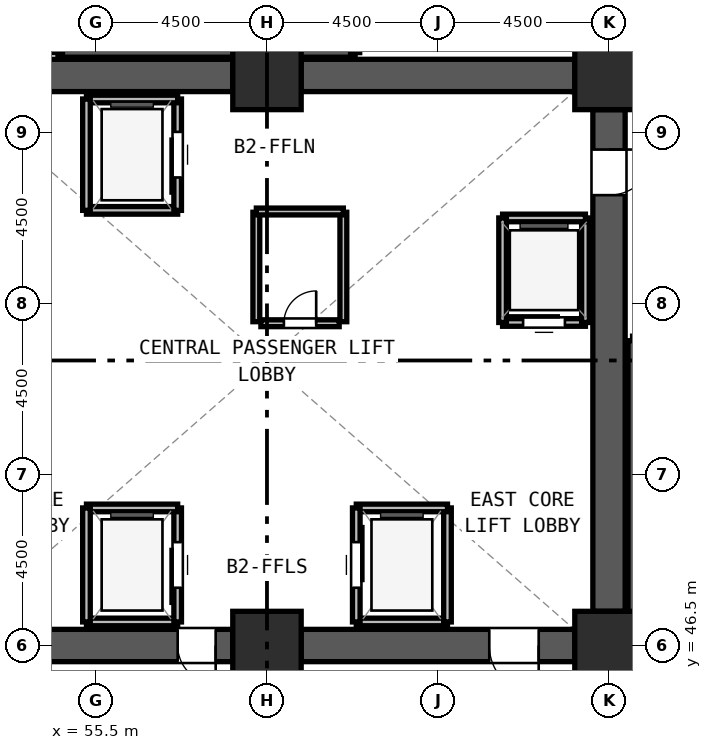
"""IFC4 building model, lengths in metres.
Left out: names, types, materials, properties, quantities, classifications, styles, units other than length and angle.
Written with IfcOpenShell. Run it as: python <this file> out.ifc"""

import sys

from ifc_helpers import new_model, si_unit, direction, frame, frame_2d, origin, origin_2d, place, context, subcontext, project, spatial, rectangle, extrude, source, transform, mapped, element, fill, save


model = new_model("IFC4")
c1 = context("Model", 3, precision=1e-05, world=origin(), true_north=direction((0.0, 1.0)))
c2 = subcontext(c1, "Body", "Model", "MODEL_VIEW")
j1 = project(units=[si_unit("LENGTHUNIT", "METRE"), si_unit("PLANEANGLEUNIT", "RADIAN")], contexts=[c1])
p1 = place(None, origin())
s1 = spatial("IfcSite", under=j1, at=p1, CompositionType="ELEMENT")
p2 = place(p1, origin())
s2 = spatial("IfcBuilding", under=s1, at=p2, CompositionType="ELEMENT")
p3 = place(p2, frame((0.0, 0.0, -9.6)))
s3 = spatial("IfcBuildingStorey", under=s2, at=p3, CompositionType="ELEMENT", Elevation=-9.6)
m1 = source(origin(), c2, "Body", "SweptSolid", [
    extrude(rectangle(XDim=1.8, YDim=1.8, at=origin_2d()), origin(), (0.0, 0.0, 1.0), 4.8),
])
for number, where, z_axis, x_axis in (
    (1, (60.0, 46.5, 0.0), (0.0, 0.0, 1.0), (1.0, 0.0, 0.0)),
    (2, (69.0, 46.5, 0.0), (0.0, 0.0, 1.0), (1.0, 0.0, 0.0)),
    (3, (69.0, 61.5, 0.0), (0.0, 0.0, 1.0), (1.0, 0.0, 0.0)),
    (4, (60.0, 61.5, 0.0), (0.0, 0.0, 1.0), (1.0, 0.0, 0.0)),
):
    element("IfcColumn", number, at=place(p3, frame(where, z_axis=z_axis, x_axis=x_axis)), inside=s3, PredefinedType="COLUMN", context=c2, shape_type="MappedRepresentation", body=[
        mapped(m1, transform((0.0, 0.0, 0.0), x_axis=(1.0, 0.0, 0.0), y_axis=(0.0, 1.0, 0.0), z_axis=(0.0, 0.0, 1.0), scale=1.0)),
    ])
for number, where, z_axis, x_axis in (
    (5, (51.9, 61.5, 0.0), (0.0, 0.0, 1.0), (1.0, 0.0, 0.0)),
    (6, (60.9, 61.5, 0.0), (0.0, 0.0, 1.0), (1.0, 0.0, 0.0)),
):
    element("IfcWall", number, at=place(p3, frame(where, z_axis=z_axis, x_axis=x_axis)), inside=s3, PredefinedType="SHEAR", context=c2, shape_type="SweptSolid", body=[
        extrude(rectangle(XDim=7.2, YDim=0.85, at=frame_2d((3.6, 0.0))), origin(), (0.0, 0.0, 1.0), 4.5),
    ])
p4 = place(p3, frame((69.0, 60.6, 0.0), z_axis=(0.0, 0.0, 1.0), x_axis=(0.0, -1.0, 0.0)))
e7 = element("IfcWall", 7, at=p4, inside=s3, PredefinedType="SHEAR", context=c2, shape_type="SweptSolid", body=[
    extrude(rectangle(XDim=13.2, YDim=0.85, at=frame_2d((6.6, 0.0))), origin(), (0.0, 0.0, 1.0), 4.5),
])
m2 = source(origin(), c2, "Body", "SweptSolid", [
    extrude(rectangle(XDim=1.2, YDim=2.2, at=frame_2d((0.6, 1.1))), frame((0.0, 0.435, 0.0), z_axis=(0.0, -1.0, 0.0), x_axis=(1.0, 0.0, 0.0)), (0.0, 0.0, 1.0), 0.87),
])
p5 = place(p4, frame((1.05, 0.0, 0.0)))
e8 = element("IfcOpeningElement", 8, at=p5, cuts=e7, PredefinedType="OPENING", context=c2, shape_type="MappedRepresentation", body=[
    mapped(m2, transform((0.0, 0.0, 0.0), x_axis=(1.0, 0.0, 0.0), y_axis=(0.0, 1.0, 0.0), z_axis=(0.0, 0.0, 1.0), scale=1.0)),
])
p6 = place(p3, frame((68.1, 46.5, 0.0), z_axis=(0.0, 0.0, 1.0), x_axis=(-1.0, 0.0, 0.0)))
e9 = element("IfcWall", 9, at=p6, inside=s3, PredefinedType="SHEAR", context=c2, shape_type="SweptSolid", body=[
    extrude(rectangle(XDim=7.2, YDim=0.85, at=frame_2d((3.6, 0.0))), origin(), (0.0, 0.0, 1.0), 4.5),
])
m3 = source(origin(), c2, "Body", "SweptSolid", [
    extrude(rectangle(XDim=1.3, YDim=2.2, at=frame_2d((0.65, 1.1))), frame((0.0, 0.435, 0.0), z_axis=(0.0, -1.0, 0.0), x_axis=(1.0, 0.0, 0.0)), (0.0, 0.0, 1.0), 0.87),
])
p7 = place(p6, frame((0.95, 0.0, 0.0)))
e10 = element("IfcOpeningElement", 10, at=p7, cuts=e9, PredefinedType="OPENING", context=c2, shape_type="MappedRepresentation", body=[
    mapped(m3, transform((0.0, 0.0, 0.0), x_axis=(1.0, 0.0, 0.0), y_axis=(0.0, 1.0, 0.0), z_axis=(0.0, 0.0, 1.0), scale=1.0)),
])
p8 = place(p3, frame((59.1, 46.5, 0.0), z_axis=(0.0, 0.0, 1.0), x_axis=(-1.0, 0.0, 0.0)))
e11 = element("IfcWall", 11, at=p8, inside=s3, PredefinedType="SHEAR", context=c2, shape_type="SweptSolid", body=[
    extrude(rectangle(XDim=7.2, YDim=0.85, at=frame_2d((3.6, 0.0))), origin(), (0.0, 0.0, 1.0), 4.5),
])
p9 = place(p8, frame((4.95, 0.0, 0.0)))
e12 = element("IfcOpeningElement", 12, at=p9, cuts=e11, PredefinedType="OPENING", context=c2, shape_type="MappedRepresentation", body=[
    mapped(m3, transform((0.0, 0.0, 0.0), x_axis=(1.0, 0.0, 0.0), y_axis=(0.0, 1.0, 0.0), z_axis=(0.0, 0.0, 1.0), scale=1.0)),
])
m4 = source(origin(), c2, "Body", "SweptSolid", [
    extrude(rectangle(XDim=1.0, YDim=2.2, at=frame_2d((0.5, 1.1))), frame((0.0, 0.435, 0.0), z_axis=(0.0, -1.0, 0.0), x_axis=(1.0, 0.0, 0.0)), (0.0, 0.0, 1.0), 0.87),
])
p10 = place(p8, frame((0.45, 0.0, 0.0)))
e13 = element("IfcOpeningElement", 13, at=p10, cuts=e11, PredefinedType="OPENING", context=c2, shape_type="MappedRepresentation", body=[
    mapped(m4, transform((0.0, 0.0, 0.0), x_axis=(1.0, 0.0, 0.0), y_axis=(0.0, 1.0, 0.0), z_axis=(0.0, 0.0, 1.0), scale=1.0)),
])
for number, where, z_axis, x_axis in (
    (14, (69.62, 54.52, 0.0), (0.0, 0.0, 1.0), (0.0, -1.0, 0.0)),
    (15, (54.5, 62.1, 0.0), (0.0, 0.0, 1.0), (1.0, 0.0, 0.0)),
):
    element("IfcWall", number, at=place(p3, frame(where, z_axis=z_axis, x_axis=x_axis)), inside=s3, PredefinedType="SOLIDWALL", context=c2, shape_type="SweptSolid", body=[
        extrude(rectangle(XDim=7.82, YDim=0.24, at=frame_2d((3.91, 0.0))), origin(), (0.0, 0.0, 1.0), 4.5),
    ])
for number, where, z_axis, x_axis in (
    (16, (62.32, 62.1, 0.0), (0.0, 0.0, 1.0), (0.0, 1.0, 0.0)),
    (17, (54.5, 65.54, 0.0), (0.0, 0.0, 1.0), (0.0, -1.0, 0.0)),
):
    element("IfcWall", number, at=place(p3, frame(where, z_axis=z_axis, x_axis=x_axis)), inside=s3, PredefinedType="SOLIDWALL", context=c2, shape_type="SweptSolid", body=[
        extrude(rectangle(XDim=3.44, YDim=0.24, at=frame_2d((1.72, 0.0))), origin(), (0.0, 0.0, 1.0), 4.5),
    ])
p11 = place(p3, frame((55.25, 47.12, 0.0), z_axis=(0.0, 0.0, 1.0), x_axis=(1.0, 0.0, 0.0)))
e18 = element("IfcWall", 18, at=p11, inside=s3, PredefinedType="SOLIDWALL", context=c2, shape_type="SweptSolid", body=[
    extrude(rectangle(XDim=2.4, YDim=0.2, at=frame_2d((1.2, 0.0))), origin(), (0.0, 0.0, 1.0), 4.5),
])
p12 = place(p3, frame((57.65, 47.12, 0.0), z_axis=(0.0, 0.0, 1.0), x_axis=(0.0, 1.0, 0.0)))
e19 = element("IfcWall", 19, at=p12, inside=s3, PredefinedType="SOLIDWALL", context=c2, shape_type="SweptSolid", body=[
    extrude(rectangle(XDim=3.0, YDim=0.2, at=frame_2d((1.5, 0.0))), origin(), (0.0, 0.0, 1.0), 4.5),
])
m5 = source(origin(), c2, "Body", "SweptSolid", [
    extrude(rectangle(XDim=1.2, YDim=2.3, at=frame_2d((0.6, 1.15))), frame((0.0, 0.11, 0.0), z_axis=(0.0, -1.0, 0.0), x_axis=(1.0, 0.0, 0.0)), (0.0, 0.0, 1.0), 0.22),
])
p13 = place(p12, frame((0.9, 0.0, 0.0)))
e20 = element("IfcOpeningElement", 20, at=p13, cuts=e19, PredefinedType="OPENING", context=c2, shape_type="MappedRepresentation", body=[
    mapped(m5, transform((0.0, 0.0, 0.0), x_axis=(1.0, 0.0, 0.0), y_axis=(0.0, 1.0, 0.0), z_axis=(0.0, 0.0, 1.0), scale=1.0)),
])
p14 = place(p3, frame((57.65, 50.12, 0.0), z_axis=(0.0, 0.0, 1.0), x_axis=(-1.0, 0.0, 0.0)))
e21 = element("IfcWall", 21, at=p14, inside=s3, PredefinedType="SOLIDWALL", context=c2, shape_type="SweptSolid", body=[
    extrude(rectangle(XDim=2.4, YDim=0.2, at=frame_2d((1.2, 0.0))), origin(), (0.0, 0.0, 1.0), 4.5),
])
p15 = place(p3, frame((55.25, 50.12, 0.0), z_axis=(0.0, 0.0, 1.0), x_axis=(0.0, -1.0, 0.0)))
e22 = element("IfcWall", 22, at=p15, inside=s3, PredefinedType="SOLIDWALL", context=c2, shape_type="SweptSolid", body=[
    extrude(rectangle(XDim=3.0, YDim=0.2, at=frame_2d((1.5, 0.0))), origin(), (0.0, 0.0, 1.0), 4.5),
])
p16 = place(p3, frame((62.35, 47.12, 0.0), z_axis=(0.0, 0.0, 1.0), x_axis=(1.0, 0.0, 0.0)))
e23 = element("IfcWall", 23, at=p16, inside=s3, PredefinedType="SOLIDWALL", context=c2, shape_type="SweptSolid", body=[
    extrude(rectangle(XDim=2.4, YDim=0.2, at=frame_2d((1.2, 0.0))), origin(), (0.0, 0.0, 1.0), 4.5),
])
p17 = place(p3, frame((64.75, 47.12, 0.0), z_axis=(0.0, 0.0, 1.0), x_axis=(0.0, 1.0, 0.0)))
e24 = element("IfcWall", 24, at=p17, inside=s3, PredefinedType="SOLIDWALL", context=c2, shape_type="SweptSolid", body=[
    extrude(rectangle(XDim=3.0, YDim=0.2, at=frame_2d((1.5, 0.0))), origin(), (0.0, 0.0, 1.0), 4.5),
])
p18 = place(p3, frame((64.75, 50.12, 0.0), z_axis=(0.0, 0.0, 1.0), x_axis=(-1.0, 0.0, 0.0)))
e25 = element("IfcWall", 25, at=p18, inside=s3, PredefinedType="SOLIDWALL", context=c2, shape_type="SweptSolid", body=[
    extrude(rectangle(XDim=2.4, YDim=0.2, at=frame_2d((1.2, 0.0))), origin(), (0.0, 0.0, 1.0), 4.5),
])
p19 = place(p3, frame((62.35, 50.12, 0.0), z_axis=(0.0, 0.0, 1.0), x_axis=(0.0, -1.0, 0.0)))
e26 = element("IfcWall", 26, at=p19, inside=s3, PredefinedType="SOLIDWALL", context=c2, shape_type="SweptSolid", body=[
    extrude(rectangle(XDim=3.0, YDim=0.2, at=frame_2d((1.5, 0.0))), origin(), (0.0, 0.0, 1.0), 4.5),
])
p20 = place(p19, frame((0.9, 0.0, 0.0)))
e27 = element("IfcOpeningElement", 27, at=p20, cuts=e26, PredefinedType="OPENING", context=c2, shape_type="MappedRepresentation", body=[
    mapped(m5, transform((0.0, 0.0, 0.0), x_axis=(1.0, 0.0, 0.0), y_axis=(0.0, 1.0, 0.0), z_axis=(0.0, 0.0, 1.0), scale=1.0)),
])
p21 = place(p3, frame((55.25, 57.95, 0.0), z_axis=(0.0, 0.0, 1.0), x_axis=(1.0, 0.0, 0.0)))
e28 = element("IfcWall", 28, at=p21, inside=s3, PredefinedType="SOLIDWALL", context=c2, shape_type="SweptSolid", body=[
    extrude(rectangle(XDim=2.4, YDim=0.2, at=frame_2d((1.2, 0.0))), origin(), (0.0, 0.0, 1.0), 4.5),
])
p22 = place(p3, frame((57.65, 57.95, 0.0), z_axis=(0.0, 0.0, 1.0), x_axis=(0.0, 1.0, 0.0)))
e29 = element("IfcWall", 29, at=p22, inside=s3, PredefinedType="SOLIDWALL", context=c2, shape_type="SweptSolid", body=[
    extrude(rectangle(XDim=2.93, YDim=0.2, at=frame_2d((1.465, 0.0))), origin(), (0.0, 0.0, 1.0), 4.5),
])
p23 = place(p22, frame((0.865, 0.0, 0.0)))
e30 = element("IfcOpeningElement", 30, at=p23, cuts=e29, PredefinedType="OPENING", context=c2, shape_type="MappedRepresentation", body=[
    mapped(m5, transform((0.0, 0.0, 0.0), x_axis=(1.0, 0.0, 0.0), y_axis=(0.0, 1.0, 0.0), z_axis=(0.0, 0.0, 1.0), scale=1.0)),
])
p24 = place(p3, frame((57.65, 60.88, 0.0), z_axis=(0.0, 0.0, 1.0), x_axis=(-1.0, 0.0, 0.0)))
e31 = element("IfcWall", 31, at=p24, inside=s3, PredefinedType="SOLIDWALL", context=c2, shape_type="SweptSolid", body=[
    extrude(rectangle(XDim=2.4, YDim=0.2, at=frame_2d((1.2, 0.0))), origin(), (0.0, 0.0, 1.0), 4.5),
])
p25 = place(p3, frame((55.25, 60.88, 0.0), z_axis=(0.0, 0.0, 1.0), x_axis=(0.0, -1.0, 0.0)))
e32 = element("IfcWall", 32, at=p25, inside=s3, PredefinedType="SOLIDWALL", context=c2, shape_type="SweptSolid", body=[
    extrude(rectangle(XDim=2.93, YDim=0.2, at=frame_2d((1.465, 0.0))), origin(), (0.0, 0.0, 1.0), 4.5),
])
p26 = place(p3, frame((66.2, 55.0, 0.0), z_axis=(0.0, 0.0, 1.0), x_axis=(1.0, 0.0, 0.0)))
e33 = element("IfcWall", 33, at=p26, inside=s3, PredefinedType="SOLIDWALL", context=c2, shape_type="SweptSolid", body=[
    extrude(rectangle(XDim=2.18, YDim=0.2, at=frame_2d((1.09, 0.0))), origin(), (0.0, 0.0, 1.0), 4.5),
])
m6 = source(origin(), c2, "Body", "SweptSolid", [
    extrude(rectangle(XDim=1.1, YDim=2.2, at=frame_2d((0.55, 1.1))), frame((0.0, 0.11, 0.0), z_axis=(0.0, -1.0, 0.0), x_axis=(1.0, 0.0, 0.0)), (0.0, 0.0, 1.0), 0.22),
])
p27 = place(p26, frame((0.54, 0.0, 0.0)))
e34 = element("IfcOpeningElement", 34, at=p27, cuts=e33, PredefinedType="OPENING", context=c2, shape_type="MappedRepresentation", body=[
    mapped(m6, transform((0.0, 0.0, 0.0), x_axis=(1.0, 0.0, 0.0), y_axis=(0.0, 1.0, 0.0), z_axis=(0.0, 0.0, 1.0), scale=1.0)),
])
p28 = place(p3, frame((68.38, 55.0, 0.0), z_axis=(0.0, 0.0, 1.0), x_axis=(0.0, 1.0, 0.0)))
e35 = element("IfcWall", 35, at=p28, inside=s3, PredefinedType="SOLIDWALL", context=c2, shape_type="SweptSolid", body=[
    extrude(rectangle(XDim=2.75, YDim=0.2, at=frame_2d((1.375, 0.0))), origin(), (0.0, 0.0, 1.0), 4.5),
])
p29 = place(p3, frame((68.38, 57.75, 0.0), z_axis=(0.0, 0.0, 1.0), x_axis=(-1.0, 0.0, 0.0)))
e36 = element("IfcWall", 36, at=p29, inside=s3, PredefinedType="SOLIDWALL", context=c2, shape_type="SweptSolid", body=[
    extrude(rectangle(XDim=2.18, YDim=0.2, at=frame_2d((1.09, 0.0))), origin(), (0.0, 0.0, 1.0), 4.5),
])
p30 = place(p3, frame((66.2, 57.75, 0.0), z_axis=(0.0, 0.0, 1.0), x_axis=(0.0, -1.0, 0.0)))
e37 = element("IfcWall", 37, at=p30, inside=s3, PredefinedType="SOLIDWALL", context=c2, shape_type="SweptSolid", body=[
    extrude(rectangle(XDim=2.75, YDim=0.2, at=frame_2d((1.375, 0.0))), origin(), (0.0, 0.0, 1.0), 4.5),
])
p31 = place(p3, frame((59.84, 54.98, 0.0), z_axis=(0.0, 0.0, 1.0), x_axis=(1.0, 0.0, 0.0)))
e38 = element("IfcWall", 38, at=p31, inside=s3, PredefinedType="PARTITIONING", context=c2, shape_type="SweptSolid", body=[
    extrude(rectangle(XDim=2.06, YDim=0.18, at=frame_2d((1.03, 0.0))), origin(), (0.0, 0.0, 1.0), 4.5),
])
m7 = source(origin(), c2, "Body", "SweptSolid", [
    extrude(rectangle(XDim=0.85, YDim=2.1, at=frame_2d((0.425, 1.05))), frame((0.0, 0.1, 0.0), z_axis=(0.0, -1.0, 0.0), x_axis=(1.0, 0.0, 0.0)), (0.0, 0.0, 1.0), 0.2),
])
p32 = place(p31, frame((0.605, 0.0, 0.0)))
e39 = element("IfcOpeningElement", 39, at=p32, cuts=e38, PredefinedType="OPENING", context=c2, shape_type="MappedRepresentation", body=[
    mapped(m7, transform((0.0, 0.0, 0.0), x_axis=(1.0, 0.0, 0.0), y_axis=(0.0, 1.0, 0.0), z_axis=(0.0, 0.0, 1.0), scale=1.0)),
])
for number, where, z_axis, x_axis in (
    (40, (59.72, 55.02, 0.0), (0.0, 0.0, 1.0), (0.0, 1.0, 0.0)),
    (41, (62.01, 55.02, 0.0), (0.0, 0.0, 1.0), (0.0, 1.0, 0.0)),
):
    element("IfcWall", number, at=place(p3, frame(where, z_axis=z_axis, x_axis=x_axis)), inside=s3, PredefinedType="PARTITIONING", context=c2, shape_type="SweptSolid", body=[
        extrude(rectangle(XDim=2.88, YDim=0.18, at=frame_2d((1.44, 0.0))), origin(), (0.0, 0.0, 1.0), 4.5),
    ])
p33 = place(p3, frame((59.72, 57.92, 0.0), z_axis=(0.0, 0.0, 1.0), x_axis=(1.0, 0.0, 0.0)))
e42 = element("IfcWall", 42, at=p33, inside=s3, PredefinedType="PARTITIONING", context=c2, shape_type="SweptSolid", body=[
    extrude(rectangle(XDim=2.29, YDim=0.18, at=frame_2d((1.145, 0.0))), origin(), (0.0, 0.0, 1.0), 4.5),
])
m8 = source(origin(), c2, "Body", "SweptSolid", [
    extrude(rectangle(XDim=1.0, YDim=2.2, at=frame_2d((0.5, 1.1))), frame((0.0, 0.025, 0.0), z_axis=(0.0, -1.0, 0.0), x_axis=(1.0, 0.0, 0.0)), (0.0, 0.0, 1.0), 0.05),
])
p34 = place(p10, origin())
e43 = element("IfcDoor", 43, at=p34, inside=s3, OperationType="SINGLE_SWING_LEFT", PredefinedType="DOOR", context=c2, shape_type="MappedRepresentation", body=[
    mapped(m8, transform((0.0, 0.0, 0.0), x_axis=(1.0, 0.0, 0.0), y_axis=(0.0, 1.0, 0.0), z_axis=(0.0, 0.0, 1.0), scale=1.0)),
])
fill(e13, e43)
m9 = source(origin(), c2, "Body", "SweptSolid", [
    extrude(rectangle(XDim=1.3, YDim=2.2, at=frame_2d((0.65, 1.1))), frame((0.0, 0.025, 0.0), z_axis=(0.0, -1.0, 0.0), x_axis=(1.0, 0.0, 0.0)), (0.0, 0.0, 1.0), 0.05),
])
p35 = place(p7, origin())
e44 = element("IfcDoor", 44, at=p35, inside=s3, OperationType="SINGLE_SWING_LEFT", PredefinedType="DOOR", context=c2, shape_type="MappedRepresentation", body=[
    mapped(m9, transform((0.0, 0.0, 0.0), x_axis=(1.0, 0.0, 0.0), y_axis=(0.0, 1.0, 0.0), z_axis=(0.0, 0.0, 1.0), scale=1.0)),
])
fill(e10, e44)
m10 = source(origin(), c2, "Body", "SweptSolid", [
    extrude(rectangle(XDim=1.2, YDim=2.2, at=frame_2d((0.6, 1.1))), frame((0.0, 0.025, 0.0), z_axis=(0.0, -1.0, 0.0), x_axis=(1.0, 0.0, 0.0)), (0.0, 0.0, 1.0), 0.05),
])
p36 = place(p5, origin())
e45 = element("IfcDoor", 45, at=p36, inside=s3, OperationType="SINGLE_SWING_LEFT", PredefinedType="DOOR", context=c2, shape_type="MappedRepresentation", body=[
    mapped(m10, transform((0.0, 0.0, 0.0), x_axis=(1.0, 0.0, 0.0), y_axis=(0.0, 1.0, 0.0), z_axis=(0.0, 0.0, 1.0), scale=1.0)),
])
fill(e8, e45)
m11 = source(origin(), c2, "Body", "SweptSolid", [
    extrude(rectangle(XDim=1.2, YDim=2.3, at=frame_2d((0.6, 1.15))), frame((0.0, 0.025, 0.0), z_axis=(0.0, -1.0, 0.0), x_axis=(1.0, 0.0, 0.0)), (0.0, 0.0, 1.0), 0.05),
])
p37 = place(p13, origin())
e46 = element("IfcDoor", 46, at=p37, inside=s3, OperationType="SLIDING_TO_LEFT", PredefinedType="DOOR", context=c2, shape_type="MappedRepresentation", body=[
    mapped(m11, transform((0.0, 0.0, 0.0), x_axis=(1.0, 0.0, 0.0), y_axis=(0.0, 1.0, 0.0), z_axis=(0.0, 0.0, 1.0), scale=1.0)),
])
fill(e20, e46)
p38 = place(p20, origin())
e47 = element("IfcDoor", 47, at=p38, inside=s3, OperationType="SLIDING_TO_LEFT", PredefinedType="DOOR", context=c2, shape_type="MappedRepresentation", body=[
    mapped(m11, transform((0.0, 0.0, 0.0), x_axis=(1.0, 0.0, 0.0), y_axis=(0.0, 1.0, 0.0), z_axis=(0.0, 0.0, 1.0), scale=1.0)),
])
fill(e27, e47)
p39 = place(p23, origin())
e48 = element("IfcDoor", 48, at=p39, inside=s3, OperationType="SLIDING_TO_LEFT", PredefinedType="DOOR", context=c2, shape_type="MappedRepresentation", body=[
    mapped(m11, transform((0.0, 0.0, 0.0), x_axis=(1.0, 0.0, 0.0), y_axis=(0.0, 1.0, 0.0), z_axis=(0.0, 0.0, 1.0), scale=1.0)),
])
fill(e30, e48)
m12 = source(origin(), c2, "Body", "SweptSolid", [
    extrude(rectangle(XDim=1.1, YDim=2.2, at=frame_2d((0.55, 1.1))), frame((0.0, 0.025, 0.0), z_axis=(0.0, -1.0, 0.0), x_axis=(1.0, 0.0, 0.0)), (0.0, 0.0, 1.0), 0.05),
])
p40 = place(p27, origin())
e49 = element("IfcDoor", 49, at=p40, inside=s3, OperationType="SLIDING_TO_LEFT", PredefinedType="DOOR", context=c2, shape_type="MappedRepresentation", body=[
    mapped(m12, transform((0.0, 0.0, 0.0), x_axis=(1.0, 0.0, 0.0), y_axis=(0.0, 1.0, 0.0), z_axis=(0.0, 0.0, 1.0), scale=1.0)),
])
fill(e34, e49)
m13 = source(origin(), c2, "Body", "SweptSolid", [
    extrude(rectangle(XDim=0.85, YDim=2.1, at=frame_2d((0.425, 1.05))), frame((0.0, 0.025, 0.0), z_axis=(0.0, -1.0, 0.0), x_axis=(1.0, 0.0, 0.0)), (0.0, 0.0, 1.0), 0.05),
])
p41 = place(p32, origin())
e50 = element("IfcDoor", 50, at=p41, inside=s3, OperationType="SINGLE_SWING_RIGHT", PredefinedType="DOOR", context=c2, shape_type="MappedRepresentation", body=[
    mapped(m13, transform((0.0, 0.0, 0.0), x_axis=(1.0, 0.0, 0.0), y_axis=(0.0, 1.0, 0.0), z_axis=(0.0, 0.0, 1.0), scale=1.0)),
])
fill(e39, e50)
save(model, sys.argv[1])
